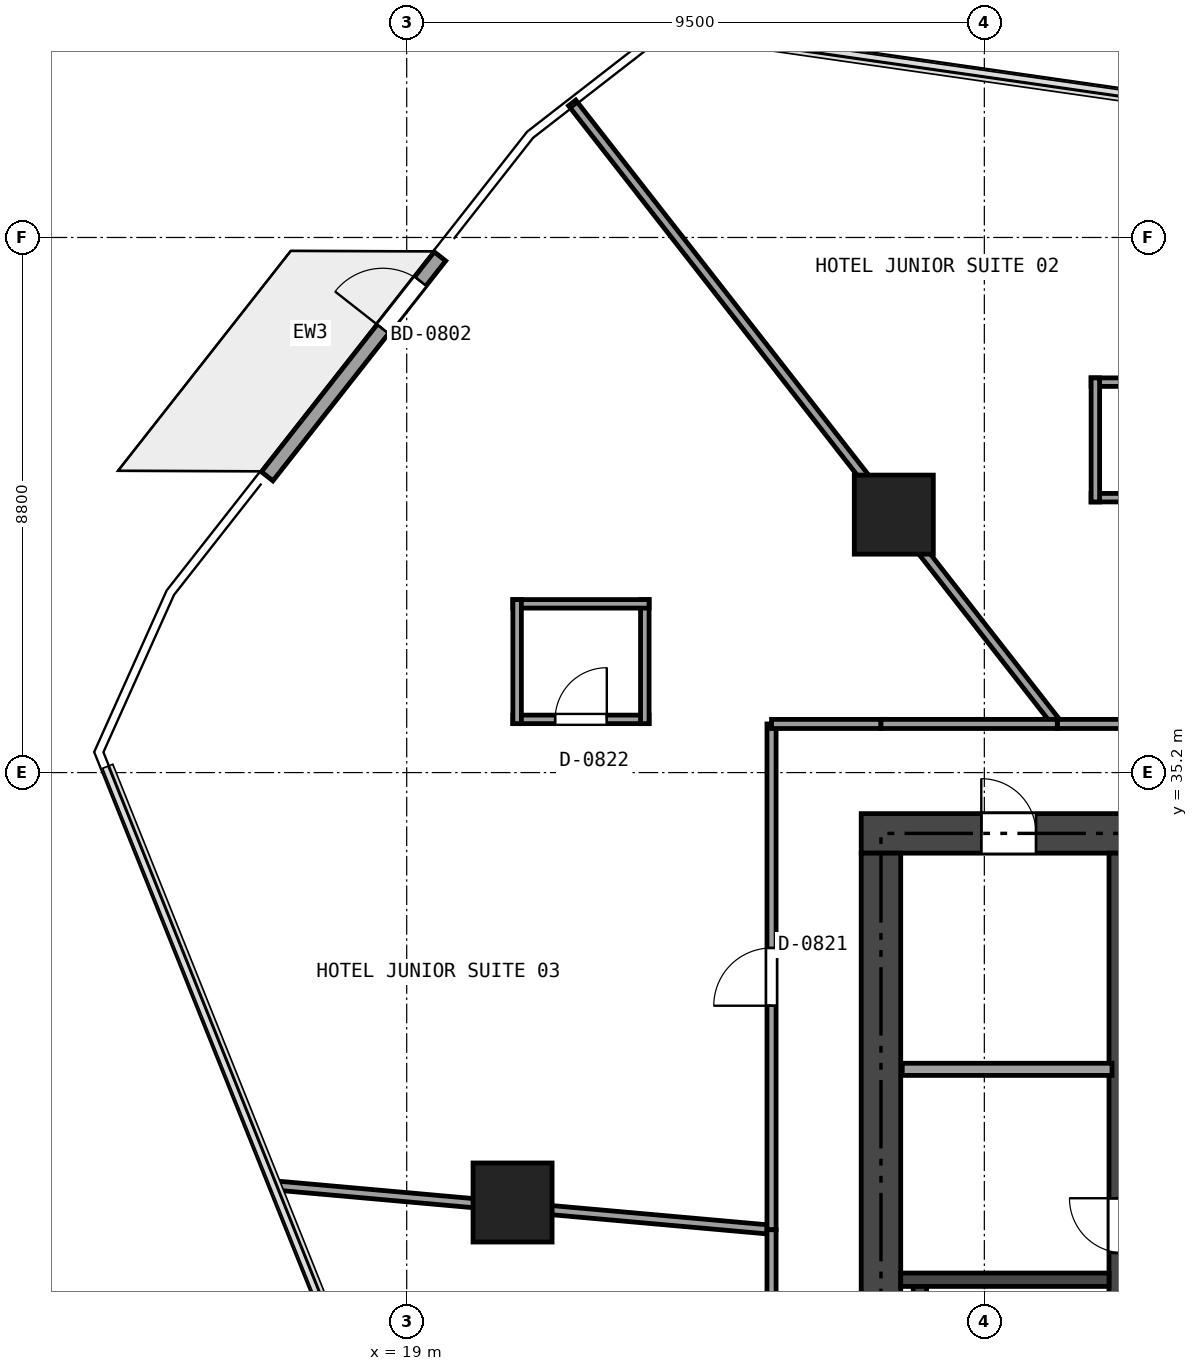
"""IFC4 building model, lengths in metres.
Left out: names, types, materials, properties, quantities, classifications, styles, units other than length and angle.
Written with IfcOpenShell. Run it as: python <this file> out.ifc"""

import sys

from ifc_helpers import new_model, si_unit, direction, frame, frame_2d, origin, origin_2d, place, context, subcontext, project, spatial, rectangle, extrude, element, fill, save


model = new_model("IFC4")
c1 = context("Model", 3, precision=1e-05, world=origin(), true_north=direction((0.0, 1.0)))
c2 = subcontext(c1, "Body", "Model", "MODEL_VIEW")
j1 = project(units=[si_unit("LENGTHUNIT", "METRE"), si_unit("PLANEANGLEUNIT", "RADIAN")], contexts=[c1])
p1 = place(None, origin())
s1 = spatial("IfcSite", under=j1, at=p1, CompositionType="ELEMENT")
p2 = place(p1, origin())
s2 = spatial("IfcBuilding", under=s1, at=p2, CompositionType="ELEMENT")
p3 = place(p2, frame((0.0, 0.0, 37.35)))
s3 = spatial("IfcBuildingStorey", under=s2, at=p3, CompositionType="ELEMENT", Elevation=37.35)
p4 = place(p3, frame((26.475, 34.2, 0.0), z_axis=(0.0, 0.0, 1.0), x_axis=(1.0, 0.0, 0.0)))
e1 = element("IfcWall", 1, at=p4, inside=s3, PredefinedType="SHEAR", context=c2, shape_type="SweptSolid", body=[
    extrude(rectangle(XDim=21.45, YDim=0.65, at=frame_2d((10.725, 0.0))), origin(), (0.0, 0.0, 1.0), 3.17),
])
p5 = place(p4, frame((9.725, 0.0, 0.0)))
e2 = element("IfcOpeningElement", 2, at=p5, cuts=e1, PredefinedType="OPENING", context=c2, shape_type="SweptSolid", body=[
    extrude(rectangle(XDim=1.1, YDim=2.15, at=frame_2d((0.55, 1.075))), frame((0.0, 0.335, 0.0), z_axis=(0.0, -1.0, 0.0), x_axis=(1.0, 0.0, 0.0)), (0.0, 0.0, 1.0), 0.67),
])
p6 = place(p4, frame((1.975, 0.0, 0.0)))
e3 = element("IfcOpeningElement", 3, at=p6, cuts=e1, PredefinedType="OPENING", context=c2, shape_type="SweptSolid", body=[
    extrude(rectangle(XDim=0.9, YDim=2.1, at=frame_2d((0.45, 1.05))), frame((0.0, 0.335, 0.0), z_axis=(0.0, -1.0, 0.0), x_axis=(1.0, 0.0, 0.0)), (0.0, 0.0, 1.0), 0.67),
])
p7 = place(p4, frame((6.275, 0.0, 0.0)))
e4 = element("IfcOpeningElement", 4, at=p7, cuts=e1, PredefinedType="OPENING", context=c2, shape_type="SweptSolid", body=[
    extrude(rectangle(XDim=0.9, YDim=2.1, at=frame_2d((0.45, 1.05))), frame((0.0, 0.335, 0.0), z_axis=(0.0, -1.0, 0.0), x_axis=(1.0, 0.0, 0.0)), (0.0, 0.0, 1.0), 0.67),
])
p8 = place(p3, frame((26.8, 18.925, 0.0), z_axis=(0.0, 0.0, 1.0), x_axis=(0.0, 1.0, 0.0)))
e5 = element("IfcWall", 5, at=p8, inside=s3, PredefinedType="SHEAR", context=c2, shape_type="SweptSolid", body=[
    extrude(rectangle(XDim=14.95, YDim=0.65, at=frame_2d((7.475, 0.0))), origin(), (0.0, 0.0, 1.0), 3.17),
])
p9 = place(p3, frame((30.8, 18.925, 0.0), z_axis=(0.0, 0.0, 1.0), x_axis=(0.0, 1.0, 0.0)))
e6 = element("IfcWall", 6, at=p9, inside=s3, PredefinedType="SHEAR", context=c2, shape_type="SweptSolid", body=[
    extrude(rectangle(XDim=14.95, YDim=0.5, at=frame_2d((7.475, 0.0))), origin(), (0.0, 0.0, 1.0), 3.17),
])
p10 = place(p9, frame((6.575, 0.0, 0.0)))
e7 = element("IfcOpeningElement", 7, at=p10, cuts=e6, PredefinedType="OPENING", context=c2, shape_type="SweptSolid", body=[
    extrude(rectangle(XDim=1.1, YDim=2.15, at=frame_2d((0.55, 1.075))), frame((0.0, 0.26, 0.0), z_axis=(0.0, -1.0, 0.0), x_axis=(1.0, 0.0, 0.0)), (0.0, 0.0, 1.0), 0.52),
])
p11 = place(p9, frame((8.375, 0.0, 0.0)))
e8 = element("IfcOpeningElement", 8, at=p11, cuts=e6, PredefinedType="OPENING", context=c2, shape_type="SweptSolid", body=[
    extrude(rectangle(XDim=0.9, YDim=2.1, at=frame_2d((0.45, 1.05))), frame((0.0, 0.26, 0.0), z_axis=(0.0, -1.0, 0.0), x_axis=(1.0, 0.0, 0.0)), (0.0, 0.0, 1.0), 0.52),
])
p12 = place(p3, frame((27.125, 26.86, 0.0), z_axis=(0.0, 0.0, 1.0), x_axis=(1.0, 0.0, 0.0)))
e9 = element("IfcWall", 9, at=p12, inside=s3, PredefinedType="SHEAR", context=c2, shape_type="SweptSolid", body=[
    extrude(rectangle(XDim=3.425, YDim=0.22, at=frame_2d((1.712, 0.0))), origin(), (0.0, 0.0, 1.0), 3.17),
])
p13 = place(p3, frame((27.44, 19.35, 0.0), z_axis=(0.0, 0.0, 1.0), x_axis=(0.0, 1.0, 0.0)))
e10 = element("IfcWall", 10, at=p13, inside=s3, PredefinedType="SHEAR", context=c2, shape_type="SweptSolid", body=[
    extrude(rectangle(XDim=7.4, YDim=0.22, at=frame_2d((3.7, 0.0))), origin(), (0.0, 0.0, 1.0), 3.17),
])
for number, where, z_axis, x_axis in (
    (11, (27.011, 39.442, 0.0), (0.0, 0.0, 1.0), (1.0, 0.0, 0.0)),
    (12, (20.741, 28.13, 0.0), (0.0, 0.0, 1.0), (1.0, 0.0, 0.0)),
):
    element("IfcColumn", number, at=place(p3, frame(where, z_axis=z_axis, x_axis=x_axis)), inside=s3, PredefinedType="COLUMN", context=c2, shape_type="SweptSolid", body=[
        extrude(rectangle(XDim=1.3, YDim=1.3, at=origin_2d()), origin(), (0.0, 0.0, 1.0), 3.17),
    ])
p14 = place(p3, frame((16.705, 40.072, 0.0), z_axis=(0.0, 0.0, 1.0), x_axis=(0.617842647649, 0.786301763158, 0.0)))
e13 = element("IfcWall", 13, at=p14, inside=s3, PredefinedType="SOLIDWALL", context=c2, shape_type="SweptSolid", body=[
    extrude(rectangle(XDim=4.6, YDim=0.24, at=frame_2d((2.3, 0.0))), origin(), (0.0, 0.0, 1.0), 3.17),
])
p15 = place(p14, frame((3.08, 0.0, 0.0)))
e14 = element("IfcOpeningElement", 14, at=p15, cuts=e13, PredefinedType="OPENING", context=c2, shape_type="SweptSolid", body=[
    extrude(rectangle(XDim=1.0, YDim=2.15, at=frame_2d((0.5, 1.075))), frame((0.0, 0.13, 0.0), z_axis=(0.0, -1.0, 0.0), x_axis=(1.0, 0.0, 0.0)), (0.0, 0.0, 1.0), 0.26),
])
p16 = place(p3, frame((27.15, 30.32, 0.0), z_axis=(0.0, 0.0, 1.0), x_axis=(1.0, 0.0, 0.0)))
e15 = element("IfcWall", 15, at=p16, inside=s3, PredefinedType="SOLIDWALL", context=c2, shape_type="SweptSolid", body=[
    extrude(rectangle(XDim=3.45, YDim=0.2, at=frame_2d((1.725, 0.0))), origin(), (0.0, 0.0, 1.0), 3.17),
])
p17 = place(p3, frame((30.256, 39.721, 0.0), z_axis=(0.0, 0.0, 1.0), x_axis=(1.0, 0.0, 0.0)))
e16 = element("IfcWall", 16, at=p17, inside=s3, PredefinedType="PARTITIONING", context=c2, shape_type="SweptSolid", body=[
    extrude(rectangle(XDim=2.24, YDim=0.14, at=frame_2d((1.12, 0.0))), origin(), (0.0, 0.0, 1.0), 2.747),
])
p18 = place(p17, frame((0.695, 0.0, 0.0)))
e17 = element("IfcOpeningElement", 17, at=p18, cuts=e16, PredefinedType="OPENING", context=c2, shape_type="SweptSolid", body=[
    extrude(rectangle(XDim=0.85, YDim=2.1, at=frame_2d((0.425, 1.05))), frame((0.0, 0.08, 0.0), z_axis=(0.0, -1.0, 0.0), x_axis=(1.0, 0.0, 0.0)), (0.0, 0.0, 1.0), 0.16),
])
p19 = place(p3, frame((32.496, 41.621, 0.0), z_axis=(0.0, 0.0, 1.0), x_axis=(-1.0, 0.0, 0.0)))
e18 = element("IfcWall", 18, at=p19, inside=s3, PredefinedType="PARTITIONING", context=c2, shape_type="SweptSolid", body=[
    extrude(rectangle(XDim=2.24, YDim=0.14, at=frame_2d((1.12, 0.0))), origin(), (0.0, 0.0, 1.0), 2.355),
])
p20 = place(p3, frame((30.326, 41.691, 0.0), z_axis=(0.0, 0.0, 1.0), x_axis=(0.0, -1.0, 0.0)))
e19 = element("IfcWall", 19, at=p20, inside=s3, PredefinedType="PARTITIONING", context=c2, shape_type="SweptSolid", body=[
    extrude(rectangle(XDim=2.04, YDim=0.14, at=frame_2d((1.02, 0.0))), origin(), (0.0, 0.0, 1.0), 2.355),
])
p21 = place(p3, frame((20.746, 36.075, 0.0), z_axis=(0.0, 0.0, 1.0), x_axis=(1.0, 0.0, 0.0)))
e20 = element("IfcWall", 20, at=p21, inside=s3, PredefinedType="PARTITIONING", context=c2, shape_type="SweptSolid", body=[
    extrude(rectangle(XDim=2.24, YDim=0.14, at=frame_2d((1.12, 0.0))), origin(), (0.0, 0.0, 1.0), 3.17),
])
p22 = place(p21, frame((0.695, 0.0, 0.0)))
e21 = element("IfcOpeningElement", 21, at=p22, cuts=e20, PredefinedType="OPENING", context=c2, shape_type="SweptSolid", body=[
    extrude(rectangle(XDim=0.85, YDim=2.1, at=frame_2d((0.425, 1.05))), frame((0.0, 0.08, 0.0), z_axis=(0.0, -1.0, 0.0), x_axis=(1.0, 0.0, 0.0)), (0.0, 0.0, 1.0), 0.16),
])
p23 = place(p3, frame((22.916, 36.005, 0.0), z_axis=(0.0, 0.0, 1.0), x_axis=(0.0, 1.0, 0.0)))
e22 = element("IfcWall", 22, at=p23, inside=s3, PredefinedType="PARTITIONING", context=c2, shape_type="SweptSolid", body=[
    extrude(rectangle(XDim=2.04, YDim=0.14, at=frame_2d((1.02, 0.0))), origin(), (0.0, 0.0, 1.0), 3.17),
])
p24 = place(p3, frame((22.986, 37.975, 0.0), z_axis=(0.0, 0.0, 1.0), x_axis=(-1.0, 0.0, 0.0)))
e23 = element("IfcWall", 23, at=p24, inside=s3, PredefinedType="PARTITIONING", context=c2, shape_type="SweptSolid", body=[
    extrude(rectangle(XDim=2.24, YDim=0.14, at=frame_2d((1.12, 0.0))), origin(), (0.0, 0.0, 1.0), 3.17),
])
p25 = place(p3, frame((20.816, 38.045, 0.0), z_axis=(0.0, 0.0, 1.0), x_axis=(0.0, -1.0, 0.0)))
e24 = element("IfcWall", 24, at=p25, inside=s3, PredefinedType="PARTITIONING", context=c2, shape_type="SweptSolid", body=[
    extrude(rectangle(XDim=2.04, YDim=0.14, at=frame_2d((1.02, 0.0))), origin(), (0.0, 0.0, 1.0), 3.17),
])
p26 = place(p3, frame((21.721, 46.213, 0.0), z_axis=(0.0, 0.0, 1.0), x_axis=(0.615652815332, -0.788017519459, 0.0)))
e25 = element("IfcWall", 25, at=p26, inside=s3, PredefinedType="PARTITIONING", context=c2, shape_type="SweptSolid", body=[
    extrude(rectangle(XDim=12.96, YDim=0.15, at=frame_2d((6.48, 0.0))), origin(), (0.0, 0.0, 1.0), 2.395),
])
p27 = place(p3, frame((29.7, 36.0, 0.0), z_axis=(0.0, 0.0, 1.0), x_axis=(1.0, 0.0, 0.0)))
e26 = element("IfcWall", 26, at=p27, inside=s3, PredefinedType="PARTITIONING", context=c2, shape_type="SweptSolid", body=[
    extrude(rectangle(XDim=7.165, YDim=0.15, at=frame_2d((3.583, 0.0))), origin(), (0.0, 0.0, 1.0), 2.395),
])
p28 = place(p27, frame((3.108, 0.0, 0.0)))
e27 = element("IfcOpeningElement", 27, at=p28, cuts=e26, PredefinedType="OPENING", context=c2, shape_type="SweptSolid", body=[
    extrude(rectangle(XDim=0.95, YDim=2.15, at=frame_2d((0.475, 1.075))), frame((0.0, 0.085, 0.0), z_axis=(0.0, -1.0, 0.0), x_axis=(1.0, 0.0, 0.0)), (0.0, 0.0, 1.0), 0.17),
])
p29 = place(p3, frame((16.792, 28.414, 0.0), z_axis=(0.0, 0.0, 1.0), x_axis=(0.996045012521, -0.088850059267, 0.0)))
e28 = element("IfcWall", 28, at=p29, inside=s3, PredefinedType="PARTITIONING", context=c2, shape_type="SweptSolid", body=[
    extrude(rectangle(XDim=8.24, YDim=0.15, at=frame_2d((4.12, 0.0))), origin(), (0.0, 0.0, 1.0), 2.395),
])
p30 = place(p3, frame((25.0, 27.682, 0.0), z_axis=(0.0, 0.0, 1.0), x_axis=(0.0, 1.0, 0.0)))
e29 = element("IfcWall", 29, at=p30, inside=s3, PredefinedType="PARTITIONING", context=c2, shape_type="SweptSolid", body=[
    extrude(rectangle(XDim=8.318, YDim=0.15, at=frame_2d((4.159, 0.0))), origin(), (0.0, 0.0, 1.0), 2.355),
])
p31 = place(p30, frame((3.684, 0.0, 0.0)))
e30 = element("IfcOpeningElement", 30, at=p31, cuts=e29, PredefinedType="OPENING", context=c2, shape_type="SweptSolid", body=[
    extrude(rectangle(XDim=0.95, YDim=2.15, at=frame_2d((0.475, 1.075))), frame((0.0, 0.085, 0.0), z_axis=(0.0, -1.0, 0.0), x_axis=(1.0, 0.0, 0.0)), (0.0, 0.0, 1.0), 0.17),
])
p32 = place(p3, frame((25.0, 36.0, 0.0), z_axis=(0.0, 0.0, 1.0), x_axis=(1.0, 0.0, 0.0)))
e31 = element("IfcWall", 31, at=p32, inside=s3, PredefinedType="PARTITIONING", context=c2, shape_type="SweptSolid", body=[
    extrude(rectangle(XDim=1.8, YDim=0.15, at=frame_2d((0.9, 0.0))), origin(), (0.0, 0.0, 1.0), 2.355),
])
p33 = place(p3, frame((26.8, 36.0, 0.0), z_axis=(0.0, 0.0, 1.0), x_axis=(1.0, 0.0, 0.0)))
e32 = element("IfcWall", 32, at=p33, inside=s3, PredefinedType="PARTITIONING", context=c2, shape_type="SweptSolid", body=[
    extrude(rectangle(XDim=2.9, YDim=0.15, at=frame_2d((1.45, 0.0))), origin(), (0.0, 0.0, 1.0), 2.395),
])
p34 = place(p3, frame((25.0, 18.6, 0.0), z_axis=(0.0, 0.0, 1.0), x_axis=(0.0, 1.0, 0.0)))
e33 = element("IfcWall", 33, at=p34, inside=s3, PredefinedType="PARTITIONING", context=c2, shape_type="SweptSolid", body=[
    extrude(rectangle(XDim=9.082, YDim=0.15, at=frame_2d((4.541, 0.0))), origin(), (0.0, 0.0, 1.0), 2.395),
])
p35 = place(p34, frame((4.066, 0.0, 0.0)))
e34 = element("IfcOpeningElement", 34, at=p35, cuts=e33, PredefinedType="OPENING", context=c2, shape_type="SweptSolid", body=[
    extrude(rectangle(XDim=0.95, YDim=2.15, at=frame_2d((0.475, 1.075))), frame((0.0, 0.085, 0.0), z_axis=(0.0, -1.0, 0.0), x_axis=(1.0, 0.0, 0.0)), (0.0, 0.0, 1.0), 0.17),
])
p36 = place(p15, origin())
e35 = element("IfcDoor", 35, at=p36, inside=s3, OperationType="SINGLE_SWING_LEFT", PredefinedType="DOOR", context=c2, shape_type="SweptSolid", body=[
    extrude(rectangle(XDim=1.0, YDim=2.15, at=frame_2d((0.5, 1.075))), frame((0.0, 0.025, 0.0), z_axis=(0.0, -1.0, 0.0), x_axis=(1.0, 0.0, 0.0)), (0.0, 0.0, 1.0), 0.05),
])
fill(e14, e35)
p37 = place(p6, origin())
e36 = element("IfcDoor", 36, at=p37, inside=s3, OperationType="SINGLE_SWING_LEFT", PredefinedType="DOOR", context=c2, shape_type="SweptSolid", body=[
    extrude(rectangle(XDim=0.9, YDim=2.1, at=frame_2d((0.45, 1.05))), frame((0.0, 0.025, 0.0), z_axis=(0.0, -1.0, 0.0), x_axis=(1.0, 0.0, 0.0)), (0.0, 0.0, 1.0), 0.05),
])
fill(e3, e36)
p38 = place(p31, origin())
e37 = element("IfcDoor", 37, at=p38, inside=s3, OperationType="SINGLE_SWING_LEFT", PredefinedType="DOOR", context=c2, shape_type="SweptSolid", body=[
    extrude(rectangle(XDim=0.95, YDim=2.15, at=frame_2d((0.475, 1.075))), frame((0.0, 0.025, 0.0), z_axis=(0.0, -1.0, 0.0), x_axis=(1.0, 0.0, 0.0)), (0.0, 0.0, 1.0), 0.05),
])
fill(e30, e37)
p39 = place(p22, origin())
e38 = element("IfcDoor", 38, at=p39, inside=s3, OperationType="SINGLE_SWING_RIGHT", PredefinedType="DOOR", context=c2, shape_type="SweptSolid", body=[
    extrude(rectangle(XDim=0.85, YDim=2.1, at=frame_2d((0.425, 1.05))), frame((0.0, 0.025, 0.0), z_axis=(0.0, -1.0, 0.0), x_axis=(1.0, 0.0, 0.0)), (0.0, 0.0, 1.0), 0.05),
])
fill(e21, e38)
save(model, sys.argv[1])
